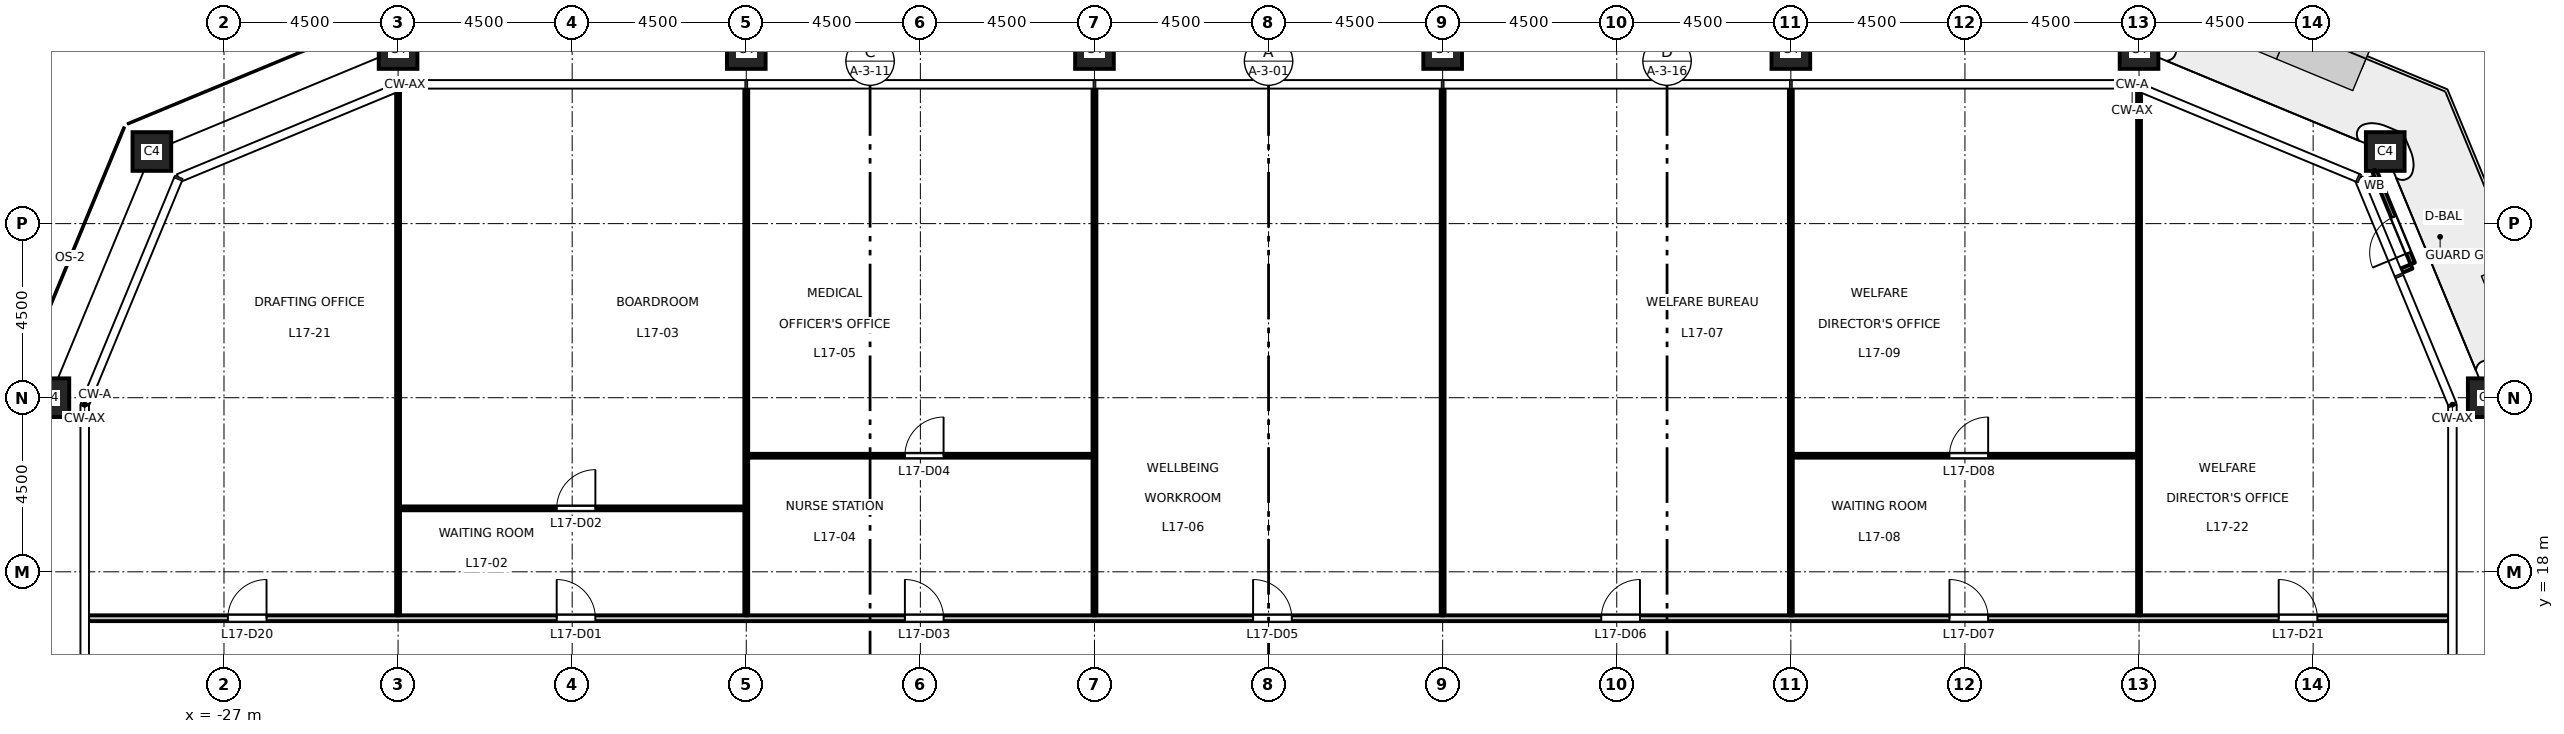
"""IFC4 building model, lengths in metres.
Left out: names, types, materials, properties, quantities, classifications, styles, units other than length and angle.
Written with IfcOpenShell. Run it as: python <this file> out.ifc"""

import sys

from ifc_helpers import new_model, si_unit, direction, frame, frame_2d, origin, origin_2d, place, context, subcontext, project, spatial, rectangle, hollow_rectangle, extrude, element, fill, save


model = new_model("IFC4")
c1 = context("Model", 3, precision=1e-05, world=origin(), true_north=direction((0.0, 1.0)))
c2 = subcontext(c1, "Body", "Model", "MODEL_VIEW")
j1 = project(units=[si_unit("LENGTHUNIT", "METRE"), si_unit("PLANEANGLEUNIT", "RADIAN")], contexts=[c1])
p1 = place(None, origin())
s1 = spatial("IfcSite", under=j1, at=p1, CompositionType="ELEMENT")
p2 = place(p1, origin())
s2 = spatial("IfcBuilding", under=s1, at=p2, CompositionType="ELEMENT")
p3 = place(p2, frame((0.0, 0.0, 80.7)))
s3 = spatial("IfcBuildingStorey", under=s2, at=p3, CompositionType="ELEMENT", Elevation=80.7)
for number, where, z_axis, x_axis in (
    (1, (31.5, 22.5, 0.0), (0.0, 0.0, 1.0), (1.0, 0.0, 0.0)),
    (2, (28.864, 28.864, 0.0), (0.0, 0.0, 1.0), (1.0, 0.0, 0.0)),
    (3, (22.5, 31.5, 0.0), (0.0, 0.0, 1.0), (1.0, 0.0, 0.0)),
    (4, (13.5, 31.5, 0.0), (0.0, 0.0, 1.0), (1.0, 0.0, 0.0)),
    (5, (4.5, 31.5, 0.0), (0.0, 0.0, 1.0), (1.0, 0.0, 0.0)),
    (6, (-4.5, 31.5, 0.0), (0.0, 0.0, 1.0), (1.0, 0.0, 0.0)),
    (7, (-13.5, 31.5, 0.0), (0.0, 0.0, 1.0), (1.0, 0.0, 0.0)),
    (8, (-22.5, 31.5, 0.0), (0.0, 0.0, 1.0), (1.0, 0.0, 0.0)),
    (9, (-28.864, 28.864, 0.0), (0.0, 0.0, 1.0), (1.0, 0.0, 0.0)),
    (10, (-31.5, 22.5, 0.0), (0.0, 0.0, 1.0), (1.0, 0.0, 0.0)),
):
    element("IfcColumn", number, at=place(p3, frame(where, z_axis=z_axis, x_axis=x_axis)), inside=s3, PredefinedType="COLUMN", context=c2, shape_type="SweptSolid", body=[
        extrude(hollow_rectangle(XDim=1.0, YDim=1.0, WallThickness=0.06, at=origin_2d()), origin(), (0.0, 0.0, 1.0), 4.5),
    ])
p4 = place(p3, frame((29.285, 25.783, 0.0), z_axis=(0.0, 0.0, 1.0), x_axis=(0.923772220778, 0.382942403136, 0.0)))
e11 = element("IfcWall", 11, at=p4, inside=s3, PredefinedType="STANDARD", context=c2, shape_type="SweptSolid", body=[
    extrude(rectangle(XDim=0.28, YDim=0.12, at=frame_2d((0.14, 0.0))), origin(), (0.0, 0.0, 1.0), 4.35),
])
p5 = place(p3, frame((28.343, 28.058, 0.0), z_axis=(0.0, 0.0, 1.0), x_axis=(0.923899985553, 0.382634050621, 0.0)))
e12 = element("IfcWall", 12, at=p5, inside=s3, PredefinedType="STANDARD", context=c2, shape_type="SweptSolid", body=[
    extrude(rectangle(XDim=0.28, YDim=0.12, at=frame_2d((0.14, 0.0))), origin(), (0.0, 0.0, 1.0), 4.35),
])
p6 = place(p3, frame((29.576, 25.969, 0.0), z_axis=(0.0, 0.0, 1.0), x_axis=(-0.382648460137, 0.923894017707, 0.0)))
e13 = element("IfcWall", 13, at=p6, inside=s3, PredefinedType="STANDARD", context=c2, shape_type="SweptSolid", body=[
    extrude(rectangle(XDim=2.592, YDim=0.12, at=frame_2d((1.296, 0.0))), origin(), (0.0, 0.0, 1.0), 4.35),
])
p7 = place(p6, frame((0.3, 0.0, 0.0)))
e14 = element("IfcOpeningElement", 14, at=p7, cuts=e13, PredefinedType="OPENING", context=c2, shape_type="SweptSolid", body=[
    extrude(rectangle(XDim=1.0, YDim=2.4, at=frame_2d((0.5, 1.2))), frame((0.0, 0.07, 0.0), z_axis=(0.0, -1.0, 0.0), x_axis=(1.0, 0.0, 0.0)), (0.0, 0.0, 1.0), 0.14),
])
p8 = place(p3, frame((-30.51, 16.8, 0.0), z_axis=(0.0, 0.0, 1.0), x_axis=(1.0, 0.0, 0.0)))
e15 = element("IfcWall", 15, at=p8, inside=s3, PredefinedType="PARTITIONING", context=c2, shape_type="SweptSolid", body=[
    extrude(rectangle(XDim=61.02, YDim=0.15, at=frame_2d((30.51, 0.0))), origin(), (0.0, 0.0, 1.0), 4.35),
])
p9 = place(p8, frame((12.11, 0.0, 0.0)))
e16 = element("IfcOpeningElement", 16, at=p9, cuts=e15, PredefinedType="OPENING", context=c2, shape_type="SweptSolid", body=[
    extrude(rectangle(XDim=1.0, YDim=2.1, at=frame_2d((0.5, 1.05))), frame((0.0, 0.085, 0.0), z_axis=(0.0, -1.0, 0.0), x_axis=(1.0, 0.0, 0.0)), (0.0, 0.0, 1.0), 0.17),
])
p10 = place(p8, frame((21.11, 0.0, 0.0)))
e17 = element("IfcOpeningElement", 17, at=p10, cuts=e15, PredefinedType="OPENING", context=c2, shape_type="SweptSolid", body=[
    extrude(rectangle(XDim=1.0, YDim=2.1, at=frame_2d((0.5, 1.05))), frame((0.0, 0.085, 0.0), z_axis=(0.0, -1.0, 0.0), x_axis=(1.0, 0.0, 0.0)), (0.0, 0.0, 1.0), 0.17),
])
p11 = place(p8, frame((30.11, 0.0, 0.0)))
e18 = element("IfcOpeningElement", 18, at=p11, cuts=e15, PredefinedType="OPENING", context=c2, shape_type="SweptSolid", body=[
    extrude(rectangle(XDim=1.0, YDim=2.1, at=frame_2d((0.5, 1.05))), frame((0.0, 0.085, 0.0), z_axis=(0.0, -1.0, 0.0), x_axis=(1.0, 0.0, 0.0)), (0.0, 0.0, 1.0), 0.17),
])
p12 = place(p8, frame((39.11, 0.0, 0.0)))
e19 = element("IfcOpeningElement", 19, at=p12, cuts=e15, PredefinedType="OPENING", context=c2, shape_type="SweptSolid", body=[
    extrude(rectangle(XDim=1.0, YDim=2.1, at=frame_2d((0.5, 1.05))), frame((0.0, 0.085, 0.0), z_axis=(0.0, -1.0, 0.0), x_axis=(1.0, 0.0, 0.0)), (0.0, 0.0, 1.0), 0.17),
])
p13 = place(p8, frame((48.11, 0.0, 0.0)))
e20 = element("IfcOpeningElement", 20, at=p13, cuts=e15, PredefinedType="OPENING", context=c2, shape_type="SweptSolid", body=[
    extrude(rectangle(XDim=1.0, YDim=2.1, at=frame_2d((0.5, 1.05))), frame((0.0, 0.085, 0.0), z_axis=(0.0, -1.0, 0.0), x_axis=(1.0, 0.0, 0.0)), (0.0, 0.0, 1.0), 0.17),
])
p14 = place(p8, frame((3.61, 0.0, 0.0)))
e21 = element("IfcOpeningElement", 21, at=p14, cuts=e15, PredefinedType="OPENING", context=c2, shape_type="SweptSolid", body=[
    extrude(rectangle(XDim=1.0, YDim=2.1, at=frame_2d((0.5, 1.05))), frame((0.0, 0.085, 0.0), z_axis=(0.0, -1.0, 0.0), x_axis=(1.0, 0.0, 0.0)), (0.0, 0.0, 1.0), 0.17),
])
p15 = place(p8, frame((56.62, 0.0, 0.0)))
e22 = element("IfcOpeningElement", 22, at=p15, cuts=e15, PredefinedType="OPENING", context=c2, shape_type="SweptSolid", body=[
    extrude(rectangle(XDim=1.0, YDim=2.1, at=frame_2d((0.5, 1.05))), frame((0.0, 0.085, 0.0), z_axis=(0.0, -1.0, 0.0), x_axis=(1.0, 0.0, 0.0)), (0.0, 0.0, 1.0), 0.17),
])
p16 = place(p3, frame((-22.45, 19.64, 0.0), z_axis=(0.0, 0.0, 1.0), x_axis=(1.0, 0.0, 0.0)))
e23 = element("IfcWall", 23, at=p16, inside=s3, PredefinedType="PARTITIONING", context=c2, shape_type="SweptSolid", body=[
    extrude(rectangle(XDim=8.9, YDim=0.1, at=frame_2d((4.45, 0.0))), origin(), (0.0, 0.0, 1.0), 4.35),
])
p17 = place(p16, frame((4.05, 0.0, 0.0)))
e24 = element("IfcOpeningElement", 24, at=p17, cuts=e23, PredefinedType="OPENING", context=c2, shape_type="SweptSolid", body=[
    extrude(rectangle(XDim=1.0, YDim=2.1, at=frame_2d((0.5, 1.05))), frame((0.0, 0.06, 0.0), z_axis=(0.0, -1.0, 0.0), x_axis=(1.0, 0.0, 0.0)), (0.0, 0.0, 1.0), 0.12),
])
p18 = place(p3, frame((-13.45, 21.0, 0.0), z_axis=(0.0, 0.0, 1.0), x_axis=(1.0, 0.0, 0.0)))
e25 = element("IfcWall", 25, at=p18, inside=s3, PredefinedType="PARTITIONING", context=c2, shape_type="SweptSolid", body=[
    extrude(rectangle(XDim=8.9, YDim=0.1, at=frame_2d((4.45, 0.0))), origin(), (0.0, 0.0, 1.0), 4.35),
])
p19 = place(p18, frame((4.05, 0.0, 0.0)))
e26 = element("IfcOpeningElement", 26, at=p19, cuts=e25, PredefinedType="OPENING", context=c2, shape_type="SweptSolid", body=[
    extrude(rectangle(XDim=1.0, YDim=2.1, at=frame_2d((0.5, 1.05))), frame((0.0, 0.06, 0.0), z_axis=(0.0, -1.0, 0.0), x_axis=(1.0, 0.0, 0.0)), (0.0, 0.0, 1.0), 0.12),
])
p20 = place(p3, frame((13.55, 21.0, 0.0), z_axis=(0.0, 0.0, 1.0), x_axis=(1.0, 0.0, 0.0)))
e27 = element("IfcWall", 27, at=p20, inside=s3, PredefinedType="PARTITIONING", context=c2, shape_type="SweptSolid", body=[
    extrude(rectangle(XDim=8.9, YDim=0.1, at=frame_2d((4.45, 0.0))), origin(), (0.0, 0.0, 1.0), 4.35),
])
p21 = place(p20, frame((4.05, 0.0, 0.0)))
e28 = element("IfcOpeningElement", 28, at=p21, cuts=e27, PredefinedType="OPENING", context=c2, shape_type="SweptSolid", body=[
    extrude(rectangle(XDim=1.0, YDim=2.1, at=frame_2d((0.5, 1.05))), frame((0.0, 0.06, 0.0), z_axis=(0.0, -1.0, 0.0), x_axis=(1.0, 0.0, 0.0)), (0.0, 0.0, 1.0), 0.12),
])
p22 = place(p3, frame((-22.5, 16.875, 0.0), z_axis=(0.0, 0.0, 1.0), x_axis=(0.0, 1.0, 0.0)))
e29 = element("IfcWall", 29, at=p22, inside=s3, PredefinedType="PARTITIONING", context=c2, shape_type="SweptSolid", body=[
    extrude(rectangle(XDim=13.553, YDim=0.1, at=frame_2d((6.776, 0.0))), origin(), (0.0, 0.0, 1.0), 3.35),
])
for number, where, z_axis, x_axis in (
    (30, (-13.5, 16.875, 0.0), (0.0, 0.0, 1.0), (0.0, 1.0, 0.0)),
    (31, (-4.5, 16.875, 0.0), (0.0, 0.0, 1.0), (0.0, 1.0, 0.0)),
    (32, (4.5, 16.875, 0.0), (0.0, 0.0, 1.0), (0.0, 1.0, 0.0)),
    (33, (13.5, 16.875, 0.0), (0.0, 0.0, 1.0), (0.0, 1.0, 0.0)),
):
    element("IfcWall", number, at=place(p3, frame(where, z_axis=z_axis, x_axis=x_axis)), inside=s3, PredefinedType="PARTITIONING", context=c2, shape_type="SweptSolid", body=[
        extrude(rectangle(XDim=13.635, YDim=0.1, at=frame_2d((6.817, 0.0))), origin(), (0.0, 0.0, 1.0), 3.35),
    ])
p23 = place(p3, frame((22.5, 16.875, 0.0), z_axis=(0.0, 0.0, 1.0), x_axis=(0.0, 1.0, 0.0)))
e34 = element("IfcWall", 34, at=p23, inside=s3, PredefinedType="PARTITIONING", context=c2, shape_type="SweptSolid", body=[
    extrude(rectangle(XDim=13.553, YDim=0.1, at=frame_2d((6.776, 0.0))), origin(), (0.0, 0.0, 1.0), 3.35),
])
p24 = place(p7, origin())
e35 = element("IfcDoor", 35, at=p24, inside=s3, OperationType="SINGLE_SWING_LEFT", PredefinedType="DOOR", context=c2, shape_type="SweptSolid", body=[
    extrude(rectangle(XDim=1.0, YDim=2.4, at=frame_2d((0.5, 1.2))), frame((0.0, 0.025, 0.0), z_axis=(0.0, -1.0, 0.0), x_axis=(1.0, 0.0, 0.0)), (0.0, 0.0, 1.0), 0.05),
])
fill(e14, e35)
p25 = place(p9, origin())
e36 = element("IfcDoor", 36, at=p25, inside=s3, OperationType="SINGLE_SWING_LEFT", PredefinedType="DOOR", context=c2, shape_type="SweptSolid", body=[
    extrude(rectangle(XDim=1.0, YDim=2.1, at=frame_2d((0.5, 1.05))), frame((0.0, 0.025, 0.0), z_axis=(0.0, -1.0, 0.0), x_axis=(1.0, 0.0, 0.0)), (0.0, 0.0, 1.0), 0.05),
])
fill(e16, e36)
p26 = place(p17, origin())
e37 = element("IfcDoor", 37, at=p26, inside=s3, OperationType="SINGLE_SWING_RIGHT", PredefinedType="DOOR", context=c2, shape_type="SweptSolid", body=[
    extrude(rectangle(XDim=1.0, YDim=2.1, at=frame_2d((0.5, 1.05))), frame((0.0, 0.025, 0.0), z_axis=(0.0, -1.0, 0.0), x_axis=(1.0, 0.0, 0.0)), (0.0, 0.0, 1.0), 0.05),
])
fill(e24, e37)
p27 = place(p10, origin())
e38 = element("IfcDoor", 38, at=p27, inside=s3, OperationType="SINGLE_SWING_LEFT", PredefinedType="DOOR", context=c2, shape_type="SweptSolid", body=[
    extrude(rectangle(XDim=1.0, YDim=2.1, at=frame_2d((0.5, 1.05))), frame((0.0, 0.025, 0.0), z_axis=(0.0, -1.0, 0.0), x_axis=(1.0, 0.0, 0.0)), (0.0, 0.0, 1.0), 0.05),
])
fill(e17, e38)
p28 = place(p19, origin())
e39 = element("IfcDoor", 39, at=p28, inside=s3, OperationType="SINGLE_SWING_RIGHT", PredefinedType="DOOR", context=c2, shape_type="SweptSolid", body=[
    extrude(rectangle(XDim=1.0, YDim=2.1, at=frame_2d((0.5, 1.05))), frame((0.0, 0.025, 0.0), z_axis=(0.0, -1.0, 0.0), x_axis=(1.0, 0.0, 0.0)), (0.0, 0.0, 1.0), 0.05),
])
fill(e26, e39)
p29 = place(p11, origin())
e40 = element("IfcDoor", 40, at=p29, inside=s3, OperationType="SINGLE_SWING_LEFT", PredefinedType="DOOR", context=c2, shape_type="SweptSolid", body=[
    extrude(rectangle(XDim=1.0, YDim=2.1, at=frame_2d((0.5, 1.05))), frame((0.0, 0.025, 0.0), z_axis=(0.0, -1.0, 0.0), x_axis=(1.0, 0.0, 0.0)), (0.0, 0.0, 1.0), 0.05),
])
fill(e18, e40)
p30 = place(p12, origin())
e41 = element("IfcDoor", 41, at=p30, inside=s3, OperationType="SINGLE_SWING_RIGHT", PredefinedType="DOOR", context=c2, shape_type="SweptSolid", body=[
    extrude(rectangle(XDim=1.0, YDim=2.1, at=frame_2d((0.5, 1.05))), frame((0.0, 0.025, 0.0), z_axis=(0.0, -1.0, 0.0), x_axis=(1.0, 0.0, 0.0)), (0.0, 0.0, 1.0), 0.05),
])
fill(e19, e41)
p31 = place(p13, origin())
e42 = element("IfcDoor", 42, at=p31, inside=s3, OperationType="SINGLE_SWING_LEFT", PredefinedType="DOOR", context=c2, shape_type="SweptSolid", body=[
    extrude(rectangle(XDim=1.0, YDim=2.1, at=frame_2d((0.5, 1.05))), frame((0.0, 0.025, 0.0), z_axis=(0.0, -1.0, 0.0), x_axis=(1.0, 0.0, 0.0)), (0.0, 0.0, 1.0), 0.05),
])
fill(e20, e42)
p32 = place(p21, origin())
e43 = element("IfcDoor", 43, at=p32, inside=s3, OperationType="SINGLE_SWING_RIGHT", PredefinedType="DOOR", context=c2, shape_type="SweptSolid", body=[
    extrude(rectangle(XDim=1.0, YDim=2.1, at=frame_2d((0.5, 1.05))), frame((0.0, 0.025, 0.0), z_axis=(0.0, -1.0, 0.0), x_axis=(1.0, 0.0, 0.0)), (0.0, 0.0, 1.0), 0.05),
])
fill(e28, e43)
p33 = place(p14, origin())
e44 = element("IfcDoor", 44, at=p33, inside=s3, OperationType="SINGLE_SWING_RIGHT", PredefinedType="DOOR", context=c2, shape_type="SweptSolid", body=[
    extrude(rectangle(XDim=1.0, YDim=2.1, at=frame_2d((0.5, 1.05))), frame((0.0, 0.025, 0.0), z_axis=(0.0, -1.0, 0.0), x_axis=(1.0, 0.0, 0.0)), (0.0, 0.0, 1.0), 0.05),
])
fill(e21, e44)
p34 = place(p15, origin())
e45 = element("IfcDoor", 45, at=p34, inside=s3, OperationType="SINGLE_SWING_LEFT", PredefinedType="DOOR", context=c2, shape_type="SweptSolid", body=[
    extrude(rectangle(XDim=1.0, YDim=2.1, at=frame_2d((0.5, 1.05))), frame((0.0, 0.025, 0.0), z_axis=(0.0, -1.0, 0.0), x_axis=(1.0, 0.0, 0.0)), (0.0, 0.0, 1.0), 0.05),
])
fill(e22, e45)
save(model, sys.argv[1])
